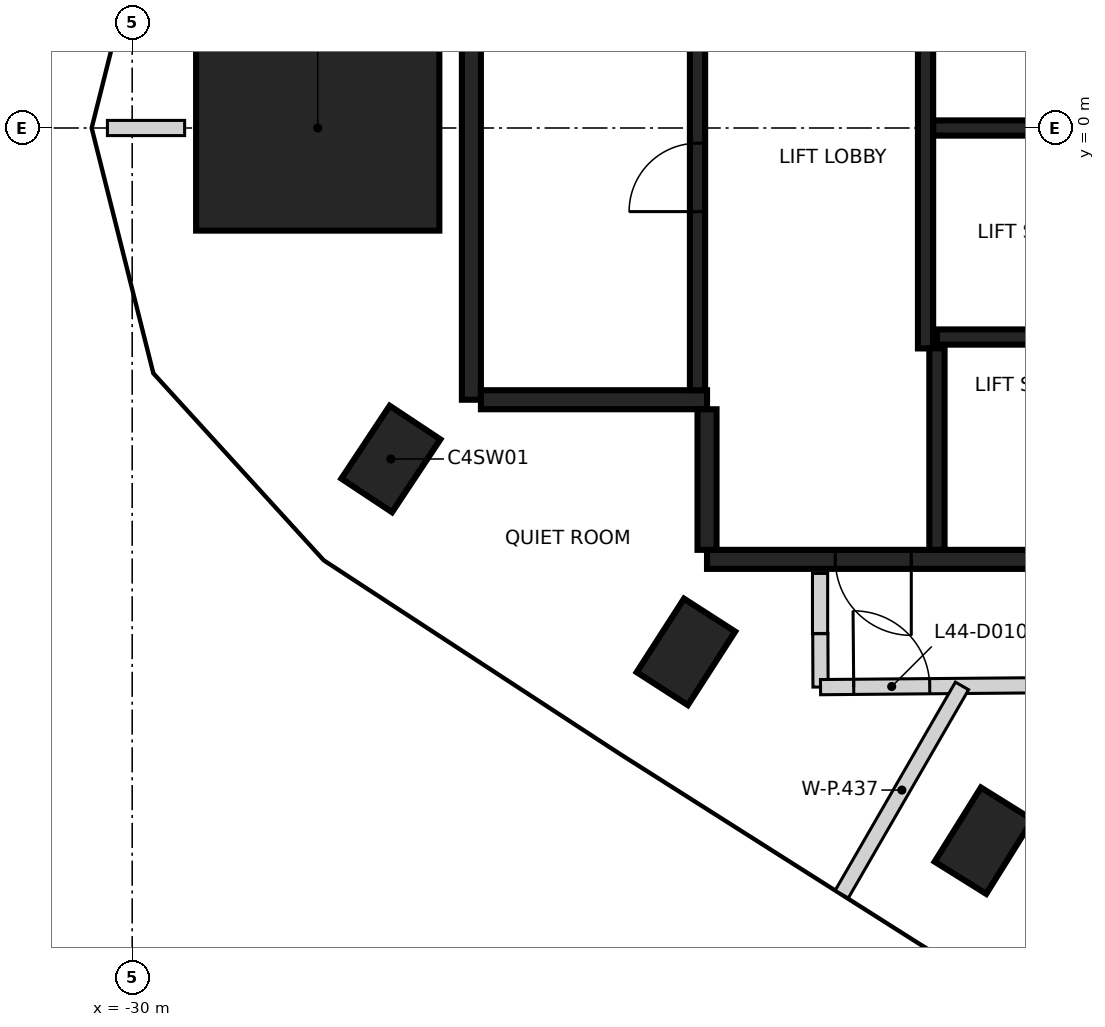
"""IFC4 building model, lengths in metres.
Left out: names, types, materials, properties, quantities, classifications, styles, units other than length and angle.
Written with IfcOpenShell. Run it as: python <this file> out.ifc"""

import sys

from ifc_helpers import new_model, si_unit, direction, frame, frame_2d, origin, origin_2d, place, context, subcontext, project, spatial, rectangle, extrude, element, fill, save


model = new_model("IFC4")
c1 = context("Model", 3, precision=1e-05, world=origin(), true_north=direction((0.0, 1.0)))
c2 = subcontext(c1, "Body", "Model", "MODEL_VIEW")
j1 = project(units=[si_unit("LENGTHUNIT", "METRE"), si_unit("PLANEANGLEUNIT", "RADIAN")], contexts=[c1])
p1 = place(None, origin())
s1 = spatial("IfcSite", under=j1, at=p1, CompositionType="ELEMENT")
p2 = place(p1, origin())
s2 = spatial("IfcBuilding", under=s1, at=p2, CompositionType="ELEMENT")
p3 = place(p2, frame((0.0, 0.0, 179.2)))
s3 = spatial("IfcBuildingStorey", under=s2, at=p3, CompositionType="ELEMENT", Elevation=179.2)
for number, where, z_axis, x_axis in (
    (1, (-26.597, -4.354, -0.35), (0.0, 0.0, 1.0), (0.553, 0.833, 0.0)),
    (2, (-22.715, -6.892, -0.35), (0.0, 0.0, 1.0), (0.541, 0.841, 0.0)),
    (3, (-18.799, -9.376, -0.35), (0.0, 0.0, 1.0), (0.529, 0.848, 0.0)),
):
    element("IfcColumn", number, at=place(p3, frame(where, z_axis=z_axis, x_axis=x_axis)), inside=s3, PredefinedType="COLUMN", context=c2, shape_type="SweptSolid", body=[
        extrude(rectangle(XDim=1.15, YDim=0.8, at=origin_2d()), origin(), (0.0, 0.0, 1.0), 3.6),
    ])
p4 = place(p3, frame((-27.559, 0.0, -0.35), z_axis=(0.0, 0.0, 1.0), x_axis=(1.0, 0.0, 0.0)))
e4 = element("IfcColumn", 4, at=p4, inside=s3, PredefinedType="COLUMN", context=c2, shape_type="SweptSolid", body=[
    extrude(rectangle(XDim=3.2, YDim=2.7, at=origin_2d()), origin(), (0.0, 0.0, 1.0), 3.6),
])
p5 = place(p3, frame((-16.187, -5.675, 0.0), z_axis=(0.0, 0.0, 1.0), x_axis=(-1.0, 0.0, 0.0)))
e5 = element("IfcWall", 5, at=p5, inside=s3, PredefinedType="SHEAR", context=c2, shape_type="SweptSolid", body=[
    extrude(rectangle(XDim=6.25, YDim=0.25, at=frame_2d((3.125, 0.0))), origin(), (0.0, 0.0, 1.0), 3.25),
])
p6 = place(p5, frame((3.563, 0.0, 0.0)))
e6 = element("IfcOpeningElement", 6, at=p6, cuts=e5, PredefinedType="OPENING", context=c2, shape_type="SweptSolid", body=[
    extrude(rectangle(XDim=1.0, YDim=2.1, at=frame_2d((0.5, 1.05))), frame((0.0, 0.135, 0.0), z_axis=(0.0, -1.0, 0.0), x_axis=(1.0, 0.0, 0.0)), (0.0, 0.0, 1.0), 0.27),
])
p7 = place(p3, frame((-25.537, -3.575, 0.0), z_axis=(0.0, 0.0, 1.0), x_axis=(0.0, 1.0, 0.0)))
e7 = element("IfcWall", 7, at=p7, inside=s3, PredefinedType="SHEAR", context=c2, shape_type="SweptSolid", body=[
    extrude(rectangle(XDim=5.85, YDim=0.25, at=frame_2d((2.925, 0.0))), origin(), (0.0, 0.0, 1.0), 3.25),
])
p8 = place(p3, frame((-22.437, -3.575, 0.0), z_axis=(0.0, 0.0, 1.0), x_axis=(-1.0, 0.0, 0.0)))
e8 = element("IfcWall", 8, at=p8, inside=s3, PredefinedType="SHEAR", context=c2, shape_type="SweptSolid", body=[
    extrude(rectangle(XDim=2.975, YDim=0.25, at=frame_2d((1.487, 0.0))), origin(), (0.0, 0.0, 1.0), 3.25),
])
p9 = place(p3, frame((-22.437, -5.55, 0.0), z_axis=(0.0, 0.0, 1.0), x_axis=(0.0, 1.0, 0.0)))
e9 = element("IfcWall", 9, at=p9, inside=s3, PredefinedType="SHEAR", context=c2, shape_type="SweptSolid", body=[
    extrude(rectangle(XDim=1.849, YDim=0.25, at=frame_2d((0.925, 0.0))), origin(), (0.0, 0.0, 1.0), 3.25),
])
p10 = place(p3, frame((-19.562, -2.9, 0.0), z_axis=(0.0, 0.0, 1.0), x_axis=(0.0, 1.0, 0.0)))
e10 = element("IfcWall", 10, at=p10, inside=s3, PredefinedType="SHEAR", context=c2, shape_type="SweptSolid", body=[
    extrude(rectangle(XDim=6.1, YDim=0.2, at=frame_2d((3.05, 0.0))), origin(), (0.0, 0.0, 1.0), 3.25),
])
p11 = place(p3, frame((-22.562, -3.449, 0.0), z_axis=(0.0, 0.0, 1.0), x_axis=(0.0, 1.0, 0.0)))
e11 = element("IfcWall", 11, at=p11, inside=s3, PredefinedType="SHEAR", context=c2, shape_type="SweptSolid", body=[
    extrude(rectangle(XDim=5.598, YDim=0.2, at=frame_2d((2.799, 0.0))), origin(), (0.0, 0.0, 1.0), 3.25),
])
p12 = place(p11, frame((2.349, 0.0, 0.0)))
e12 = element("IfcOpeningElement", 12, at=p12, cuts=e11, PredefinedType="OPENING", context=c2, shape_type="SweptSolid", body=[
    extrude(rectangle(XDim=0.9, YDim=2.1, at=frame_2d((0.45, 1.05))), frame((0.0, 0.11, 0.0), z_axis=(0.0, -1.0, 0.0), x_axis=(1.0, 0.0, 0.0)), (0.0, 0.0, 1.0), 0.22),
])
p13 = place(p3, frame((-16.263, 0.0, 0.0), z_axis=(0.0, 0.0, 1.0), x_axis=(-1.0, 0.0, 0.0)))
e13 = element("IfcWall", 13, at=p13, inside=s3, PredefinedType="SHEAR", context=c2, shape_type="SweptSolid", body=[
    extrude(rectangle(XDim=3.198, YDim=0.2, at=frame_2d((1.599, 0.0))), origin(), (0.0, 0.0, 1.0), 3.25),
])
p14 = place(p3, frame((-19.412, -2.75, 0.0), z_axis=(0.0, 0.0, 1.0), x_axis=(1.0, 0.0, 0.0)))
e14 = element("IfcWall", 14, at=p14, inside=s3, PredefinedType="SHEAR", context=c2, shape_type="SweptSolid", body=[
    extrude(rectangle(XDim=3.1, YDim=0.2, at=frame_2d((1.55, 0.0))), origin(), (0.0, 0.0, 1.0), 3.25),
])
p15 = place(p3, frame((-19.412, -5.549, 0.0), z_axis=(0.0, 0.0, 1.0), x_axis=(0.0, 1.0, 0.0)))
e15 = element("IfcWall", 15, at=p15, inside=s3, PredefinedType="SHEAR", context=c2, shape_type="SweptSolid", body=[
    extrude(rectangle(XDim=2.651, YDim=0.2, at=frame_2d((1.325, 0.0))), origin(), (0.0, 0.0, 1.0), 3.25),
])
p16 = place(p3, frame((-20.95, -6.65, 0.0), z_axis=(0.0, 0.0, 1.0), x_axis=(0.0, 1.0, 0.0)))
e16 = element("IfcWall", 16, at=p16, inside=s3, PredefinedType="PARTITIONING", context=c2, shape_type="SweptSolid", body=[
    extrude(rectangle(XDim=0.79, YDim=0.2, at=frame_2d((0.395, 0.0))), origin(), (0.0, 0.0, 1.0), 3.25),
])
p17 = place(p3, frame((-20.947, -6.653, 0.0), z_axis=(0.0, 0.0, 1.0), x_axis=(0.004173876686, -0.999991289339, 0.0)))
e17 = element("IfcWall", 17, at=p17, inside=s3, PredefinedType="PARTITIONING", context=c2, shape_type="SweptSolid", body=[
    extrude(rectangle(XDim=0.702, YDim=0.2, at=frame_2d((0.351, 0.0))), origin(), (0.0, 0.0, 1.0), 3.25),
])
p18 = place(p3, frame((-20.944, -7.356, 0.0), z_axis=(0.0, 0.0, 1.0), x_axis=(0.999963588164, 0.008533600955, 0.0)))
e18 = element("IfcWall", 18, at=p18, inside=s3, PredefinedType="PARTITIONING", context=c2, shape_type="SweptSolid", body=[
    extrude(rectangle(XDim=10.357, YDim=0.2, at=frame_2d((5.178, 0.0))), origin(), (0.0, 0.0, 1.0), 3.25),
])
p19 = place(p18, frame((0.437, 0.0, 0.0)))
e19 = element("IfcOpeningElement", 19, at=p19, cuts=e18, PredefinedType="OPENING", context=c2, shape_type="SweptSolid", body=[
    extrude(rectangle(XDim=1.0, YDim=2.1, at=frame_2d((0.5, 1.05))), frame((0.0, 0.11, 0.0), z_axis=(0.0, -1.0, 0.0), x_axis=(1.0, 0.0, 0.0)), (0.0, 0.0, 1.0), 0.22),
])
p20 = place(p18, frame((4.968, 0.0, 0.0)))
e20 = element("IfcOpeningElement", 20, at=p20, cuts=e18, PredefinedType="OPENING", context=c2, shape_type="SweptSolid", body=[
    extrude(rectangle(XDim=0.95, YDim=2.1, at=frame_2d((0.475, 1.05))), frame((0.0, 0.11, 0.0), z_axis=(0.0, -1.0, 0.0), x_axis=(1.0, 0.0, 0.0)), (0.0, 0.0, 1.0), 0.22),
])
p21 = place(p3, frame((-30.326, 0.0, 0.0), z_axis=(0.0, 0.0, 1.0), x_axis=(1.0, 0.0, 0.0)))
e21 = element("IfcWall", 21, at=p21, inside=s3, PredefinedType="PARTITIONING", context=c2, shape_type="SweptSolid", body=[
    extrude(rectangle(XDim=1.016, YDim=0.2, at=frame_2d((0.508, 0.0))), origin(), (0.0, 0.0, 1.0), 3.25),
])
p22 = place(p3, frame((-20.665, -10.08, 0.0), z_axis=(0.0, 0.0, 1.0), x_axis=(0.499931743679, 0.866064808003, 0.0)))
e22 = element("IfcWall", 22, at=p22, inside=s3, PredefinedType="PARTITIONING", context=c2, shape_type="SweptSolid", body=[
    extrude(rectangle(XDim=3.164, YDim=0.2, at=frame_2d((1.582, 0.0))), origin(), (0.0, 0.0, 1.0), 2.35),
])
p23 = place(p6, origin())
e23 = element("IfcDoor", 23, at=p23, inside=s3, OperationType="SINGLE_SWING_LEFT", PredefinedType="DOOR", context=c2, shape_type="SweptSolid", body=[
    extrude(rectangle(XDim=1.0, YDim=2.1, at=frame_2d((0.5, 1.05))), frame((0.0, 0.025, 0.0), z_axis=(0.0, -1.0, 0.0), x_axis=(1.0, 0.0, 0.0)), (0.0, 0.0, 1.0), 0.05),
])
fill(e6, e23)
p24 = place(p12, origin())
e24 = element("IfcDoor", 24, at=p24, inside=s3, OperationType="SINGLE_SWING_RIGHT", PredefinedType="DOOR", context=c2, shape_type="SweptSolid", body=[
    extrude(rectangle(XDim=0.9, YDim=2.1, at=frame_2d((0.45, 1.05))), frame((0.0, 0.025, 0.0), z_axis=(0.0, -1.0, 0.0), x_axis=(1.0, 0.0, 0.0)), (0.0, 0.0, 1.0), 0.05),
])
fill(e12, e24)
p25 = place(p19, origin())
e25 = element("IfcDoor", 25, at=p25, inside=s3, OperationType="SINGLE_SWING_LEFT", PredefinedType="DOOR", context=c2, shape_type="SweptSolid", body=[
    extrude(rectangle(XDim=1.0, YDim=2.1, at=frame_2d((0.5, 1.05))), frame((0.0, 0.025, 0.0), z_axis=(0.0, -1.0, 0.0), x_axis=(1.0, 0.0, 0.0)), (0.0, 0.0, 1.0), 0.05),
])
fill(e19, e25)
save(model, sys.argv[1])
